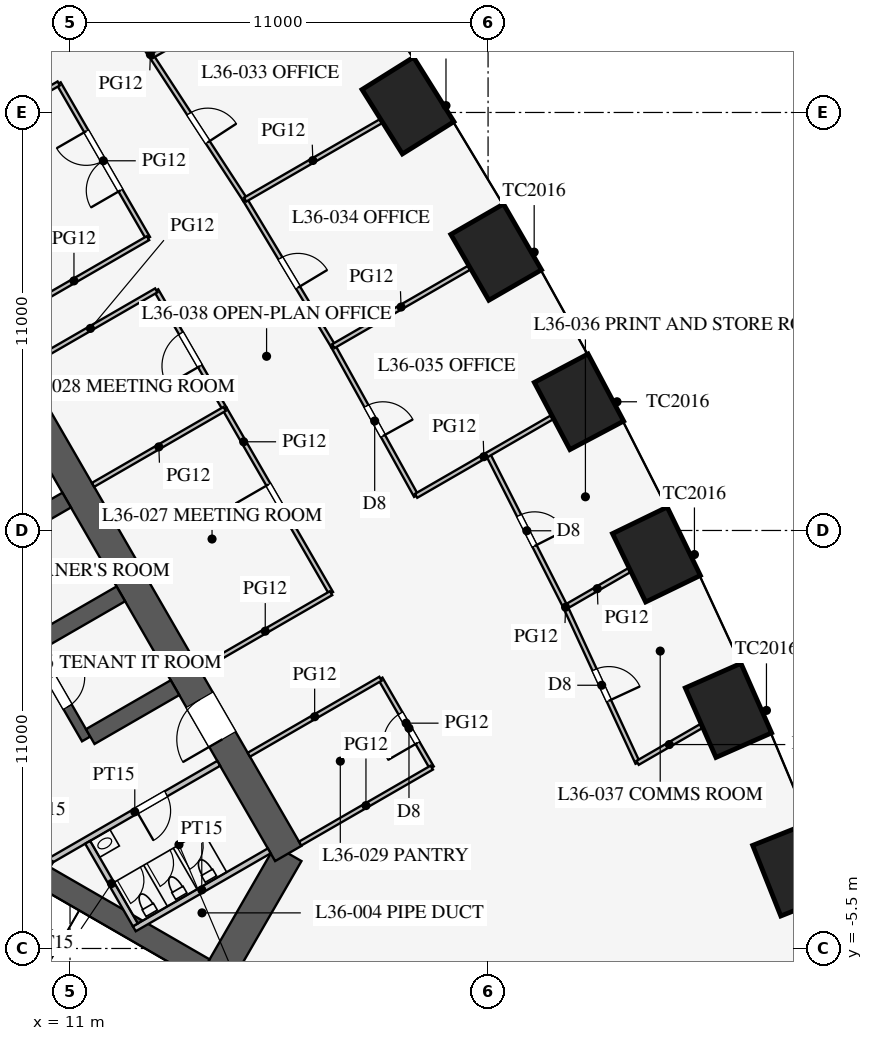
"""IFC4 building model, lengths in metres.
Left out: names, types, materials, properties, quantities, classifications, styles, units other than length and angle.
Written with IfcOpenShell. Run it as: python <this file> out.ifc"""

import sys

from ifc_helpers import new_model, si_unit, direction, frame, frame_2d, origin, origin_2d, place, context, subcontext, project, spatial, rectangle, extrude, element, fill, save


model = new_model("IFC4")
c1 = context("Model", 3, precision=1e-05, world=origin(), true_north=direction((0.0, 1.0)))
c2 = subcontext(c1, "Body", "Model", "MODEL_VIEW")
j1 = project(units=[si_unit("LENGTHUNIT", "METRE"), si_unit("PLANEANGLEUNIT", "RADIAN")], contexts=[c1])
p1 = place(None, origin())
s1 = spatial("IfcSite", under=j1, at=p1, CompositionType="ELEMENT")
p2 = place(p1, origin())
s2 = spatial("IfcBuilding", under=s1, at=p2, CompositionType="ELEMENT")
p3 = place(p2, frame((0.0, 0.0, 157.7)))
s3 = spatial("IfcBuildingStorey", under=s2, at=p3, CompositionType="ELEMENT", Elevation=157.7)
for number, where, z_axis, x_axis in (
    (1, (30.077, -3.42, 0.0), (0.0, 0.0, 1.0), (-0.37, 0.929, 0.0)),
    (2, (28.325, 0.765, 0.0), (0.0, 0.0, 1.0), (-0.403, 0.915, 0.0)),
    (3, (26.43, 4.867, 0.0), (0.0, 0.0, 1.0), (-0.436, 0.9, 0.0)),
    (4, (24.393, 8.887, 0.0), (0.0, 0.0, 1.0), (-0.468, 0.883, 0.0)),
    (5, (22.213, 12.825, 0.0), (0.0, 0.0, 1.0), (-0.5, 0.866, 0.0)),
    (6, (19.893, 16.681, 0.0), (0.0, 0.0, 1.0), (-0.531, 0.847, 0.0)),
):
    element("IfcColumn", number, at=place(p3, frame(where, z_axis=z_axis, x_axis=x_axis)), inside=s3, PredefinedType="COLUMN", context=c2, shape_type="SweptSolid", body=[
        extrude(rectangle(XDim=2.0, YDim=1.6, at=origin_2d()), origin(), (0.0, 0.0, 1.0), 4.2),
    ])
p4 = place(p3, frame((10.97, -13.0, 0.0), z_axis=(0.0, 0.0, 1.0), x_axis=(0.499995765644, 0.866027848477, 0.0)))
e7 = element("IfcWall", 7, at=p4, inside=s3, PredefinedType="SHEAR", context=c2, shape_type="SweptSolid", body=[
    extrude(rectangle(XDim=11.547, YDim=0.8, at=frame_2d((5.773, 0.0))), origin(), (0.0, 0.0, 1.0), 4.2),
])
p5 = place(p3, frame((16.743, -3.0, 0.0), z_axis=(0.0, 0.0, 1.0), x_axis=(-0.500002442456, 0.866023993627, 0.0)))
e8 = element("IfcWall", 8, at=p5, inside=s3, PredefinedType="SHEAR", context=c2, shape_type="SweptSolid", body=[
    extrude(rectangle(XDim=21.939, YDim=0.8, at=frame_2d((10.97, 0.0))), origin(), (0.0, 0.0, 1.0), 4.2),
])
p6 = place(p5, frame((17.27, 0.0, 0.0)))
e9 = element("IfcOpeningElement", 9, at=p6, cuts=e8, PredefinedType="OPENING", context=c2, shape_type="SweptSolid", body=[
    extrude(rectangle(XDim=1.2, YDim=2.1, at=frame_2d((0.6, 1.05))), frame((0.0, 0.41, 0.0), z_axis=(0.0, -1.0, 0.0), x_axis=(1.0, 0.0, 0.0)), (0.0, 0.0, 1.0), 0.82),
])
p7 = place(p5, frame((3.47, 0.0, 0.0)))
e10 = element("IfcOpeningElement", 10, at=p7, cuts=e8, PredefinedType="OPENING", context=c2, shape_type="SweptSolid", body=[
    extrude(rectangle(XDim=1.2, YDim=2.1, at=frame_2d((0.6, 1.05))), frame((0.0, 0.41, 0.0), z_axis=(0.0, -1.0, 0.0), x_axis=(1.0, 0.0, 0.0)), (0.0, 0.0, 1.0), 0.82),
])
p8 = place(p3, frame((11.424, 0.014, 0.0), z_axis=(0.0, 0.0, 1.0), x_axis=(-0.500001763848, 0.866024385424, 0.0)))
e11 = element("IfcWall", 11, at=p8, inside=s3, PredefinedType="SHEAR", context=c2, shape_type="SweptSolid", body=[
    extrude(rectangle(XDim=11.4, YDim=0.25, at=frame_2d((5.7, 0.0))), origin(), (0.0, 0.0, 1.0), 4.2),
])
p9 = place(p8, frame((0.975, 0.0, 0.0)))
e12 = element("IfcOpeningElement", 12, at=p9, cuts=e11, PredefinedType="OPENING", context=c2, shape_type="SweptSolid", body=[
    extrude(rectangle(XDim=0.9, YDim=2.1, at=frame_2d((0.45, 1.05))), frame((0.0, 0.135, 0.0), z_axis=(0.0, -1.0, 0.0), x_axis=(1.0, 0.0, 0.0)), (0.0, 0.0, 1.0), 0.27),
])
p10 = place(p8, frame((3.825, 0.0, 0.0)))
e13 = element("IfcOpeningElement", 13, at=p10, cuts=e11, PredefinedType="OPENING", context=c2, shape_type="SweptSolid", body=[
    extrude(rectangle(XDim=0.9, YDim=2.1, at=frame_2d((0.45, 1.05))), frame((0.0, 0.135, 0.0), z_axis=(0.0, -1.0, 0.0), x_axis=(1.0, 0.0, 0.0)), (0.0, 0.0, 1.0), 0.27),
])
for number, where, z_axis, x_axis in (
    (14, (11.532, 0.076, 0.0), (0.0, 0.0, 1.0), (0.866, 0.5, 0.0)),
    (15, (10.107, 2.544, 0.0), (0.0, 0.0, 1.0), (0.866, 0.5, 0.0)),
    (16, (8.682, 5.012, 0.0), (0.0, 0.0, 1.0), (0.866, 0.5, 0.0)),
):
    element("IfcWall", number, at=place(p3, frame(where, z_axis=z_axis, x_axis=x_axis)), inside=s3, PredefinedType="SHEAR", context=c2, shape_type="SweptSolid", body=[
        extrude(rectangle(XDim=2.575, YDim=0.45, at=frame_2d((1.288, 0.0))), origin(), (0.0, 0.0, 1.0), 4.2),
    ])
for number, where, z_axis, x_axis in (
    (17, (4.638, -5.016, 0.0), (0.0, 0.0, 1.0), (0.866, -0.5, 0.0)),
    (18, (6.663, -1.509, 0.0), (0.0, 0.0, 1.0), (0.866, -0.5, 0.0)),
):
    element("IfcWall", number, at=place(p3, frame(where, z_axis=z_axis, x_axis=x_axis)), inside=s3, PredefinedType="SHEAR", context=c2, shape_type="SweptSolid", body=[
        extrude(rectangle(XDim=9.075, YDim=0.6, at=frame_2d((4.538, 0.0))), origin(), (0.0, 0.0, 1.0), 4.2),
    ])
p11 = place(p3, frame((10.495, -3.178, 0.0), z_axis=(0.0, 0.0, 1.0), x_axis=(0.86602216432, 0.500005610874, 0.0)))
e19 = element("IfcWall", 19, at=p11, inside=s3, PredefinedType="PARTITIONING", context=c2, shape_type="SweptSolid", body=[
    extrude(rectangle(XDim=5.1, YDim=0.15, at=frame_2d((2.55, 0.0))), origin(), (0.0, 0.0, 1.0), 4.0),
])
p12 = place(p11, frame((2.6, 0.0, 0.0)))
e20 = element("IfcOpeningElement", 20, at=p12, cuts=e19, PredefinedType="OPENING", context=c2, shape_type="SweptSolid", body=[
    extrude(rectangle(XDim=0.9, YDim=2.1, at=frame_2d((0.45, 1.05))), frame((0.0, 0.085, 0.0), z_axis=(0.0, -1.0, 0.0), x_axis=(1.0, 0.0, 0.0)), (0.0, 0.0, 1.0), 0.17),
])
p13 = place(p3, frame((10.495, -3.178, 0.0), z_axis=(0.0, 0.0, 1.0), x_axis=(-0.499842556608, -0.866116284689, 0.0)))
e21 = element("IfcWall", 21, at=p13, inside=s3, PredefinedType="PARTITIONING", context=c2, shape_type="SweptSolid", body=[
    extrude(rectangle(XDim=0.645, YDim=0.15, at=frame_2d((0.323, 0.0))), origin(), (0.0, 0.0, 1.0), 4.0),
])
p14 = place(p3, frame((12.691, -4.982, 0.0), z_axis=(0.0, 0.0, 1.0), x_axis=(0.8660249478, 0.500000789788, 0.0)))
e22 = element("IfcWall", 22, at=p14, inside=s3, PredefinedType="PARTITIONING", context=c2, shape_type="SweptSolid", body=[
    extrude(rectangle(XDim=4.1, YDim=0.15, at=frame_2d((2.05, 0.0))), origin(), (0.0, 0.0, 1.0), 4.0),
])
p15 = place(p3, frame((11.464, -2.706, 0.0), z_axis=(0.0, 0.0, 1.0), x_axis=(0.50001992892, -0.866013897511, 0.0)))
e23 = element("IfcWall", 23, at=p15, inside=s3, PredefinedType="PARTITIONING", context=c2, shape_type="SweptSolid", body=[
    extrude(rectangle(XDim=2.51, YDim=0.15, at=frame_2d((1.255, 0.0))), origin(), (0.0, 0.0, 1.0), 4.0),
])
p16 = place(p3, frame((13.052, 13.194, 0.0), z_axis=(0.0, 0.0, 1.0), x_axis=(-0.499977259774, 0.866038532462, 0.0)))
e24 = element("IfcWall", 24, at=p16, inside=s3, PredefinedType="PARTITIONING", context=c2, shape_type="SweptSolid", body=[
    extrude(rectangle(XDim=4.7, YDim=0.12, at=frame_2d((2.35, 0.0))), origin(), (0.0, 0.0, 1.0), 2.9),
])
p17 = place(p16, frame((1.45, 0.0, 0.15)))
e25 = element("IfcOpeningElement", 25, at=p17, cuts=e24, PredefinedType="OPENING", context=c2, shape_type="SweptSolid", body=[
    extrude(rectangle(XDim=1.8, YDim=2.1, at=frame_2d((0.9, 1.05))), frame((0.0, 0.07, 0.0), z_axis=(0.0, -1.0, 0.0), x_axis=(1.0, 0.0, 0.0)), (0.0, 0.0, 1.0), 0.14),
])
p18 = place(p3, frame((15.069, 8.7, 0.0), z_axis=(0.0, 0.0, 1.0), x_axis=(-0.500012057535, 0.866018442252, 0.0)))
e26 = element("IfcWall", 26, at=p18, inside=s3, PredefinedType="PARTITIONING", context=c2, shape_type="SweptSolid", body=[
    extrude(rectangle(XDim=3.6, YDim=0.12, at=frame_2d((1.8, 0.0))), origin(), (0.0, 0.0, 1.0), 2.9),
])
p19 = place(p18, frame((1.3, 0.0, 0.15)))
e27 = element("IfcOpeningElement", 27, at=p19, cuts=e26, PredefinedType="OPENING", context=c2, shape_type="SweptSolid", body=[
    extrude(rectangle(XDim=1.0, YDim=2.1, at=frame_2d((0.5, 1.05))), frame((0.0, 0.07, 0.0), z_axis=(0.0, -1.0, 0.0), x_axis=(1.0, 0.0, 0.0)), (0.0, 0.0, 1.0), 0.14),
])
p20 = place(p3, frame((20.519, -0.74, 0.0), z_axis=(0.0, 0.0, 1.0), x_axis=(-0.4999416173, 0.866059108428, 0.0)))
e28 = element("IfcWall", 28, at=p20, inside=s3, PredefinedType="PARTITIONING", context=c2, shape_type="SweptSolid", body=[
    extrude(rectangle(XDim=2.7, YDim=0.12, at=frame_2d((1.35, 0.0))), origin(), (0.0, 0.0, 1.0), 2.9),
])
p21 = place(p20, frame((0.75, 0.0, 0.15)))
e29 = element("IfcOpeningElement", 29, at=p21, cuts=e28, PredefinedType="OPENING", context=c2, shape_type="SweptSolid", body=[
    extrude(rectangle(XDim=0.9, YDim=2.1, at=frame_2d((0.45, 1.05))), frame((0.0, 0.07, 0.0), z_axis=(0.0, -1.0, 0.0), x_axis=(1.0, 0.0, 0.0)), (0.0, 0.0, 1.0), 0.14),
])
p22 = place(p3, frame((17.869, 3.85, 0.0), z_axis=(0.0, 0.0, 1.0), x_axis=(-0.500016814911, 0.866015695474, 0.0)))
e30 = element("IfcWall", 30, at=p22, inside=s3, PredefinedType="PARTITIONING", context=c2, shape_type="SweptSolid", body=[
    extrude(rectangle(XDim=5.6, YDim=0.12, at=frame_2d((2.8, 0.0))), origin(), (0.0, 0.0, 1.0), 2.9),
])
p23 = place(p22, frame((2.3, 0.0, 0.15)))
e31 = element("IfcOpeningElement", 31, at=p23, cuts=e30, PredefinedType="OPENING", context=c2, shape_type="SweptSolid", body=[
    extrude(rectangle(XDim=1.0, YDim=2.1, at=frame_2d((0.5, 1.05))), frame((0.0, 0.07, 0.0), z_axis=(0.0, -1.0, 0.0), x_axis=(1.0, 0.0, 0.0)), (0.0, 0.0, 1.0), 0.14),
])
p24 = place(p3, frame((9.805, 9.818, 0.0), z_axis=(0.0, 0.0, 1.0), x_axis=(0.866026010844, 0.49999894854, 0.0)))
e32 = element("IfcWall", 32, at=p24, inside=s3, PredefinedType="PARTITIONING", context=c2, shape_type="SweptSolid", body=[
    extrude(rectangle(XDim=4.0, YDim=0.12, at=frame_2d((2.0, 0.0))), origin(), (0.0, 0.0, 1.0), 2.9),
])
p25 = place(p3, frame((9.155, 10.944, 0.0), z_axis=(0.0, 0.0, 1.0), x_axis=(0.866017533419, 0.500013631625, 0.0)))
e33 = element("IfcWall", 33, at=p25, inside=s3, PredefinedType="PARTITIONING", context=c2, shape_type="SweptSolid", body=[
    extrude(rectangle(XDim=4.5, YDim=0.12, at=frame_2d((2.25, 0.0))), origin(), (0.0, 0.0, 1.0), 2.9),
])
p26 = place(p3, frame((6.805, 15.014, 0.0), z_axis=(0.0, 0.0, 1.0), x_axis=(0.866031096941, 0.499990139034, 0.0)))
e34 = element("IfcWall", 34, at=p26, inside=s3, PredefinedType="PARTITIONING", context=c2, shape_type="SweptSolid", body=[
    extrude(rectangle(XDim=4.5, YDim=0.12, at=frame_2d((2.25, 0.0))), origin(), (0.0, 0.0, 1.0), 2.9),
])
p27 = place(p3, frame((11.605, 6.7, 0.0), z_axis=(0.0, 0.0, 1.0), x_axis=(0.866026010844, 0.49999894854, 0.0)))
e35 = element("IfcWall", 35, at=p27, inside=s3, PredefinedType="PARTITIONING", context=c2, shape_type="SweptSolid", body=[
    extrude(rectangle(XDim=4.0, YDim=0.12, at=frame_2d((2.0, 0.0))), origin(), (0.0, 0.0, 1.0), 2.8),
])
for number, where, z_axis, x_axis in (
    (36, (17.055, -2.74, 0.0), (0.0, 0.0, 1.0), (0.866, 0.5, 0.0)),
    (37, (14.405, 1.85, 0.0), (0.0, 0.0, 1.0), (0.866, 0.5, 0.0)),
    (38, (15.705, -0.401, 0.0), (0.0, 0.0, 1.0), (0.866, 0.5, 0.0)),
):
    element("IfcWall", number, at=place(p3, frame(where, z_axis=z_axis, x_axis=x_axis)), inside=s3, PredefinedType="PARTITIONING", context=c2, shape_type="SweptSolid", body=[
        extrude(rectangle(XDim=4.0, YDim=0.12, at=frame_2d((2.0, 0.0))), origin(), (0.0, 0.0, 1.0), 2.9),
    ])
p28 = place(p3, frame((17.927, 10.35, 0.0), z_axis=(0.0, 0.0, 1.0), x_axis=(-0.515548366618, 0.856860479703, 0.0)))
e39 = element("IfcWall", 39, at=p28, inside=s3, PredefinedType="PARTITIONING", context=c2, shape_type="SweptSolid", body=[
    extrude(rectangle(XDim=4.501, YDim=0.12, at=frame_2d((2.25, 0.0))), origin(), (0.0, 0.0, 1.0), 2.9),
])
p29 = place(p28, frame((1.8, 0.0, 0.15)))
e40 = element("IfcOpeningElement", 40, at=p29, cuts=e39, PredefinedType="OPENING", context=c2, shape_type="SweptSolid", body=[
    extrude(rectangle(XDim=0.9, YDim=2.1, at=frame_2d((0.45, 1.05))), frame((0.0, 0.07, 0.0), z_axis=(0.0, -1.0, 0.0), x_axis=(1.0, 0.0, 0.0)), (0.0, 0.0, 1.0), 0.14),
])
p30 = place(p3, frame((15.606, 14.206, 0.0), z_axis=(0.0, 0.0, 1.0), x_axis=(-0.546069464151, 0.837739900161, 0.0)))
e41 = element("IfcWall", 41, at=p30, inside=s3, PredefinedType="PARTITIONING", context=c2, shape_type="SweptSolid", body=[
    extrude(rectangle(XDim=4.507, YDim=0.12, at=frame_2d((2.253, 0.0))), origin(), (0.0, 0.0, 1.0), 2.9),
])
p31 = place(p30, frame((1.8, 0.0, 0.15)))
e42 = element("IfcOpeningElement", 42, at=p31, cuts=e41, PredefinedType="OPENING", context=c2, shape_type="SweptSolid", body=[
    extrude(rectangle(XDim=0.9, YDim=2.1, at=frame_2d((0.45, 1.05))), frame((0.0, 0.07, 0.0), z_axis=(0.0, -1.0, 0.0), x_axis=(1.0, 0.0, 0.0)), (0.0, 0.0, 1.0), 0.14),
])
p32 = place(p3, frame((13.145, 17.982, 0.0), z_axis=(0.0, 0.0, 1.0), x_axis=(-0.575987178736, 0.817458726745, 0.0)))
e43 = element("IfcWall", 43, at=p32, inside=s3, PredefinedType="PARTITIONING", context=c2, shape_type="SweptSolid", body=[
    extrude(rectangle(XDim=4.518, YDim=0.12, at=frame_2d((2.259, 0.0))), origin(), (0.0, 0.0, 1.0), 2.9),
])
p33 = place(p32, frame((1.8, 0.0, 0.15)))
e44 = element("IfcOpeningElement", 44, at=p33, cuts=e43, PredefinedType="OPENING", context=c2, shape_type="SweptSolid", body=[
    extrude(rectangle(XDim=0.9, YDim=2.1, at=frame_2d((0.45, 1.05))), frame((0.0, 0.07, 0.0), z_axis=(0.0, -1.0, 0.0), x_axis=(1.0, 0.0, 0.0)), (0.0, 0.0, 1.0), 0.14),
])
p34 = place(p3, frame((25.935, -0.615, 0.0), z_axis=(0.0, 0.0, 1.0), x_axis=(-0.41992827805, 0.90755729367, 0.0)))
e45 = element("IfcWall", 45, at=p34, inside=s3, PredefinedType="PARTITIONING", context=c2, shape_type="SweptSolid", body=[
    extrude(rectangle(XDim=4.519, YDim=0.12, at=frame_2d((2.259, 0.0))), origin(), (0.0, 0.0, 1.0), 2.9),
])
p35 = place(p34, frame((1.8, 0.0, 0.15)))
e46 = element("IfcOpeningElement", 46, at=p35, cuts=e45, PredefinedType="OPENING", context=c2, shape_type="SweptSolid", body=[
    extrude(rectangle(XDim=0.9, YDim=2.1, at=frame_2d((0.45, 1.05))), frame((0.0, 0.07, 0.0), z_axis=(0.0, -1.0, 0.0), x_axis=(1.0, 0.0, 0.0)), (0.0, 0.0, 1.0), 0.14),
])
p36 = place(p3, frame((20.106, 6.412, 0.0), z_axis=(0.0, 0.0, 1.0), x_axis=(-0.484292898211, 0.874905931368, 0.0)))
e47 = element("IfcWall", 47, at=p36, inside=s3, PredefinedType="PARTITIONING", context=c2, shape_type="SweptSolid", body=[
    extrude(rectangle(XDim=4.501, YDim=0.12, at=frame_2d((2.25, 0.0))), origin(), (0.0, 0.0, 1.0), 2.9),
])
p37 = place(p36, frame((1.8, 0.0, 0.15)))
e48 = element("IfcOpeningElement", 48, at=p37, cuts=e47, PredefinedType="OPENING", context=c2, shape_type="SweptSolid", body=[
    extrude(rectangle(XDim=0.9, YDim=2.1, at=frame_2d((0.45, 1.05))), frame((0.0, 0.07, 0.0), z_axis=(0.0, -1.0, 0.0), x_axis=(1.0, 0.0, 0.0)), (0.0, 0.0, 1.0), 0.14),
])
p38 = place(p3, frame((24.037, 3.486, 0.0), z_axis=(0.0, 0.0, 1.0), x_axis=(-0.452428593635, 0.891800632239, 0.0)))
e49 = element("IfcWall", 49, at=p38, inside=s3, PredefinedType="PARTITIONING", context=c2, shape_type="SweptSolid", body=[
    extrude(rectangle(XDim=4.506, YDim=0.12, at=frame_2d((2.253, 0.0))), origin(), (0.0, 0.0, 1.0), 2.9),
])
p39 = place(p38, frame((1.8, 0.0, 0.15)))
e50 = element("IfcOpeningElement", 50, at=p39, cuts=e49, PredefinedType="OPENING", context=c2, shape_type="SweptSolid", body=[
    extrude(rectangle(XDim=0.9, YDim=2.1, at=frame_2d((0.45, 1.05))), frame((0.0, 0.07, 0.0), z_axis=(0.0, -1.0, 0.0), x_axis=(1.0, 0.0, 0.0)), (0.0, 0.0, 1.0), 0.14),
])
p40 = place(p3, frame((17.927, 10.35, 0.0), z_axis=(0.0, 0.0, 1.0), x_axis=(0.866009926209, 0.50002680699, 0.0)))
e51 = element("IfcWall", 51, at=p40, inside=s3, PredefinedType="PARTITIONING", context=c2, shape_type="SweptSolid", body=[
    extrude(rectangle(XDim=4.12, YDim=0.12, at=frame_2d((2.06, 0.0))), origin(), (0.0, 0.0, 1.0), 2.8),
])
p41 = place(p3, frame((15.606, 14.206, 0.0), z_axis=(0.0, 0.0, 1.0), x_axis=(0.866016800201, 0.500014901547, 0.0)))
e52 = element("IfcWall", 52, at=p41, inside=s3, PredefinedType="PARTITIONING", context=c2, shape_type="SweptSolid", body=[
    extrude(rectangle(XDim=4.119, YDim=0.12, at=frame_2d((2.06, 0.0))), origin(), (0.0, 0.0, 1.0), 2.8),
])
p42 = place(p3, frame((13.145, 17.982, 0.0), z_axis=(0.0, 0.0, 1.0), x_axis=(0.866018637367, 0.500011719595, 0.0)))
e53 = element("IfcWall", 53, at=p42, inside=s3, PredefinedType="PARTITIONING", context=c2, shape_type="SweptSolid", body=[
    extrude(rectangle(XDim=4.116, YDim=0.12, at=frame_2d((2.058, 0.0))), origin(), (0.0, 0.0, 1.0), 2.9),
])
p43 = place(p3, frame((25.935, -0.615, 0.0), z_axis=(0.0, 0.0, 1.0), x_axis=(0.866042003473, 0.499971247393, 0.0)))
e54 = element("IfcWall", 54, at=p43, inside=s3, PredefinedType="PARTITIONING", context=c2, shape_type="SweptSolid", body=[
    extrude(rectangle(XDim=1.925, YDim=0.12, at=frame_2d((0.963, 0.0))), origin(), (0.0, 0.0, 1.0), 2.6),
])
p44 = place(p3, frame((20.106, 6.412, 0.0), z_axis=(0.0, 0.0, 1.0), x_axis=(0.866016800201, 0.500014901547, 0.0)))
e55 = element("IfcWall", 55, at=p44, inside=s3, PredefinedType="PARTITIONING", context=c2, shape_type="SweptSolid", body=[
    extrude(rectangle(XDim=4.119, YDim=0.12, at=frame_2d((2.06, 0.0))), origin(), (0.0, 0.0, 1.0), 2.8),
])
p45 = place(p3, frame((24.037, 3.486, 0.0), z_axis=(0.0, 0.0, 1.0), x_axis=(0.866040295995, 0.499974205047, 0.0)))
e56 = element("IfcWall", 56, at=p45, inside=s3, PredefinedType="PARTITIONING", context=c2, shape_type="SweptSolid", body=[
    extrude(rectangle(XDim=1.931, YDim=0.12, at=frame_2d((0.965, 0.0))), origin(), (0.0, 0.0, 1.0), 2.9),
])
p46 = place(p12, frame((0.9, 0.0, 0.0), z_axis=(0.0, 0.0, 1.0), x_axis=(-1.0, 0.0, 0.0)))
e57 = element("IfcDoor", 57, at=p46, inside=s3, OperationType="SINGLE_SWING_RIGHT", PredefinedType="DOOR", context=c2, shape_type="SweptSolid", body=[
    extrude(rectangle(XDim=0.9, YDim=2.1, at=frame_2d((0.45, 1.05))), frame((0.0, 0.025, 0.0), z_axis=(0.0, -1.0, 0.0), x_axis=(1.0, 0.0, 0.0)), (0.0, 0.0, 1.0), 0.05),
])
fill(e20, e57)
p47 = place(p7, origin())
e58 = element("IfcDoor", 58, at=p47, inside=s3, OperationType="SINGLE_SWING_LEFT", PredefinedType="DOOR", context=c2, shape_type="SweptSolid", body=[
    extrude(rectangle(XDim=1.2, YDim=2.1, at=frame_2d((0.6, 1.05))), frame((0.0, 0.025, 0.0), z_axis=(0.0, -1.0, 0.0), x_axis=(1.0, 0.0, 0.0)), (0.0, 0.0, 1.0), 0.05),
])
fill(e10, e58)
p48 = place(p9, frame((0.9, 0.0, 0.0), z_axis=(0.0, 0.0, 1.0), x_axis=(-1.0, 0.0, 0.0)))
e59 = element("IfcDoor", 59, at=p48, inside=s3, OperationType="SINGLE_SWING_LEFT", PredefinedType="DOOR", context=c2, shape_type="SweptSolid", body=[
    extrude(rectangle(XDim=0.9, YDim=2.1, at=frame_2d((0.45, 1.05))), frame((0.0, 0.025, 0.0), z_axis=(0.0, -1.0, 0.0), x_axis=(1.0, 0.0, 0.0)), (0.0, 0.0, 1.0), 0.05),
])
fill(e12, e59)
p49 = place(p17, origin())
e60 = element("IfcDoor", 60, at=p49, inside=s3, OperationType="DOUBLE_DOOR_SINGLE_SWING", PredefinedType="DOOR", context=c2, shape_type="SweptSolid", body=[
    extrude(rectangle(XDim=1.8, YDim=2.1, at=frame_2d((0.9, 1.05))), frame((0.0, 0.025, 0.0), z_axis=(0.0, -1.0, 0.0), x_axis=(1.0, 0.0, 0.0)), (0.0, 0.0, 1.0), 0.05),
])
fill(e25, e60)
p50 = place(p23, origin())
e61 = element("IfcDoor", 61, at=p50, inside=s3, OperationType="SINGLE_SWING_RIGHT", PredefinedType="DOOR", context=c2, shape_type="SweptSolid", body=[
    extrude(rectangle(XDim=1.0, YDim=2.1, at=frame_2d((0.5, 1.05))), frame((0.0, 0.025, 0.0), z_axis=(0.0, -1.0, 0.0), x_axis=(1.0, 0.0, 0.0)), (0.0, 0.0, 1.0), 0.05),
])
fill(e31, e61)
p51 = place(p19, origin())
e62 = element("IfcDoor", 62, at=p51, inside=s3, OperationType="SINGLE_SWING_LEFT", PredefinedType="DOOR", context=c2, shape_type="SweptSolid", body=[
    extrude(rectangle(XDim=1.0, YDim=2.1, at=frame_2d((0.5, 1.05))), frame((0.0, 0.025, 0.0), z_axis=(0.0, -1.0, 0.0), x_axis=(1.0, 0.0, 0.0)), (0.0, 0.0, 1.0), 0.05),
])
fill(e27, e62)
p52 = place(p21, origin())
e63 = element("IfcDoor", 63, at=p52, inside=s3, OperationType="SINGLE_SWING_LEFT", PredefinedType="DOOR", context=c2, shape_type="SweptSolid", body=[
    extrude(rectangle(XDim=0.9, YDim=2.1, at=frame_2d((0.45, 1.05))), frame((0.0, 0.025, 0.0), z_axis=(0.0, -1.0, 0.0), x_axis=(1.0, 0.0, 0.0)), (0.0, 0.0, 1.0), 0.05),
])
fill(e29, e63)
p53 = place(p31, frame((0.9, 0.0, 0.0), z_axis=(0.0, 0.0, 1.0), x_axis=(-1.0, 0.0, 0.0)))
e64 = element("IfcDoor", 64, at=p53, inside=s3, OperationType="SINGLE_SWING_RIGHT", PredefinedType="DOOR", context=c2, shape_type="SweptSolid", body=[
    extrude(rectangle(XDim=0.9, YDim=2.1, at=frame_2d((0.45, 1.05))), frame((0.0, 0.025, 0.0), z_axis=(0.0, -1.0, 0.0), x_axis=(1.0, 0.0, 0.0)), (0.0, 0.0, 1.0), 0.05),
])
fill(e42, e64)
p54 = place(p29, frame((0.9, 0.0, 0.0), z_axis=(0.0, 0.0, 1.0), x_axis=(-1.0, 0.0, 0.0)))
e65 = element("IfcDoor", 65, at=p54, inside=s3, OperationType="SINGLE_SWING_RIGHT", PredefinedType="DOOR", context=c2, shape_type="SweptSolid", body=[
    extrude(rectangle(XDim=0.9, YDim=2.1, at=frame_2d((0.45, 1.05))), frame((0.0, 0.025, 0.0), z_axis=(0.0, -1.0, 0.0), x_axis=(1.0, 0.0, 0.0)), (0.0, 0.0, 1.0), 0.05),
])
fill(e40, e65)
p55 = place(p37, frame((0.9, 0.0, 0.0), z_axis=(0.0, 0.0, 1.0), x_axis=(-1.0, 0.0, 0.0)))
e66 = element("IfcDoor", 66, at=p55, inside=s3, OperationType="SINGLE_SWING_RIGHT", PredefinedType="DOOR", context=c2, shape_type="SweptSolid", body=[
    extrude(rectangle(XDim=0.9, YDim=2.1, at=frame_2d((0.45, 1.05))), frame((0.0, 0.025, 0.0), z_axis=(0.0, -1.0, 0.0), x_axis=(1.0, 0.0, 0.0)), (0.0, 0.0, 1.0), 0.05),
])
fill(e48, e66)
p56 = place(p39, frame((0.9, 0.0, 0.0), z_axis=(0.0, 0.0, 1.0), x_axis=(-1.0, 0.0, 0.0)))
e67 = element("IfcDoor", 67, at=p56, inside=s3, OperationType="SINGLE_SWING_RIGHT", PredefinedType="DOOR", context=c2, shape_type="SweptSolid", body=[
    extrude(rectangle(XDim=0.9, YDim=2.1, at=frame_2d((0.45, 1.05))), frame((0.0, 0.025, 0.0), z_axis=(0.0, -1.0, 0.0), x_axis=(1.0, 0.0, 0.0)), (0.0, 0.0, 1.0), 0.05),
])
fill(e50, e67)
p57 = place(p35, frame((0.9, 0.0, 0.0), z_axis=(0.0, 0.0, 1.0), x_axis=(-1.0, 0.0, 0.0)))
e68 = element("IfcDoor", 68, at=p57, inside=s3, OperationType="SINGLE_SWING_RIGHT", PredefinedType="DOOR", context=c2, shape_type="SweptSolid", body=[
    extrude(rectangle(XDim=0.9, YDim=2.1, at=frame_2d((0.45, 1.05))), frame((0.0, 0.025, 0.0), z_axis=(0.0, -1.0, 0.0), x_axis=(1.0, 0.0, 0.0)), (0.0, 0.0, 1.0), 0.05),
])
fill(e46, e68)
save(model, sys.argv[1])
